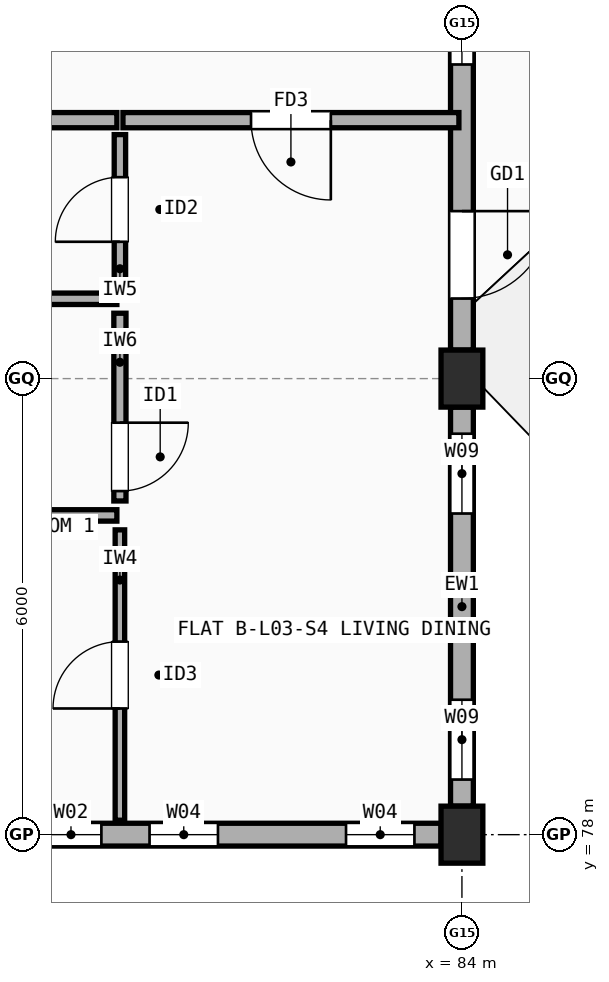
"""IFC4 building model, lengths in metres.
Left out: names, types, materials, properties, quantities, classifications, styles, units other than length and angle.
Written with IfcOpenShell. Run it as: python <this file> out.ifc"""

import sys

from ifc_helpers import new_model, si_unit, direction, frame, frame_2d, origin, origin_2d, place, context, subcontext, project, spatial, rectangle, extrude, element, fill, save


model = new_model("IFC4")
c1 = context("Model", 3, precision=1e-05, world=origin(), true_north=direction((0.0, 1.0)))
c2 = subcontext(c1, "Body", "Model", "MODEL_VIEW")
j1 = project(units=[si_unit("LENGTHUNIT", "METRE"), si_unit("PLANEANGLEUNIT", "RADIAN")], contexts=[c1])
p1 = place(None, origin())
s1 = spatial("IfcSite", under=j1, at=p1, CompositionType="ELEMENT")
p2 = place(p1, origin())
s2 = spatial("IfcBuilding", under=s1, at=p2, CompositionType="ELEMENT")
p3 = place(p2, frame((0.0, 0.0, 10.9)))
s3 = spatial("IfcBuildingStorey", under=s2, at=p3, CompositionType="ELEMENT", Elevation=10.9)
for number, where, z_axis, x_axis in (
    (1, (84.0, 78.0, 0.0), (0.0, 0.0, 1.0), (1.0, 0.0, 0.0)),
    (2, (84.0, 84.0, 0.0), (0.0, 0.0, 1.0), (1.0, 0.0, 0.0)),
):
    element("IfcColumn", number, at=place(p3, frame(where, z_axis=z_axis, x_axis=x_axis)), inside=s3, PredefinedType="COLUMN", context=c2, shape_type="SweptSolid", body=[
        extrude(rectangle(XDim=0.55, YDim=0.75, at=origin_2d()), origin(), (0.0, 0.0, 1.0), 2.96),
    ])
p4 = place(p3, frame((78.275, 78.0, 0.0), z_axis=(0.0, 0.0, 1.0), x_axis=(1.0, 0.0, 0.0)))
e3 = element("IfcWall", 3, at=p4, inside=s3, PredefinedType="STANDARD", context=c2, shape_type="SweptSolid", body=[
    extrude(rectangle(XDim=5.45, YDim=0.3, at=frame_2d((2.725, 0.0))), origin(), (0.0, 0.0, 1.0), 2.442),
])
p5 = place(p4, frame((1.615, 0.0, 0.9)))
e4 = element("IfcOpeningElement", 4, at=p5, cuts=e3, PredefinedType="OPENING", context=c2, shape_type="SweptSolid", body=[
    extrude(rectangle(XDim=0.9, YDim=1.3, at=frame_2d((0.45, 0.65))), frame((0.0, 0.16, 0.0), z_axis=(0.0, -1.0, 0.0), x_axis=(1.0, 0.0, 0.0)), (0.0, 0.0, 1.0), 0.32),
])
p6 = place(p4, frame((4.2, 0.0, 0.9)))
e5 = element("IfcOpeningElement", 5, at=p6, cuts=e3, PredefinedType="OPENING", context=c2, shape_type="SweptSolid", body=[
    extrude(rectangle(XDim=0.9, YDim=1.3, at=frame_2d((0.45, 0.65))), frame((0.0, 0.16, 0.0), z_axis=(0.0, -1.0, 0.0), x_axis=(1.0, 0.0, 0.0)), (0.0, 0.0, 1.0), 0.32),
])
p7 = place(p4, frame((0.181, 0.0, 0.9)))
e6 = element("IfcOpeningElement", 6, at=p7, cuts=e3, PredefinedType="OPENING", context=c2, shape_type="SweptSolid", body=[
    extrude(rectangle(XDim=0.8, YDim=1.2, at=frame_2d((0.4, 0.6))), frame((0.0, 0.16, 0.0), z_axis=(0.0, -1.0, 0.0), x_axis=(1.0, 0.0, 0.0)), (0.0, 0.0, 1.0), 0.32),
])
p8 = place(p3, frame((84.0, 78.375, 0.0), z_axis=(0.0, 0.0, 1.0), x_axis=(0.0, 1.0, 0.0)))
e7 = element("IfcWall", 7, at=p8, inside=s3, PredefinedType="STANDARD", context=c2, shape_type="SweptSolid", body=[
    extrude(rectangle(XDim=5.25, YDim=0.3, at=frame_2d((2.625, 0.0))), origin(), (0.0, 0.0, 1.0), 2.442),
])
p9 = place(p8, frame((0.35, 0.0, 0.9)))
e8 = element("IfcOpeningElement", 8, at=p9, cuts=e7, PredefinedType="OPENING", context=c2, shape_type="SweptSolid", body=[
    extrude(rectangle(XDim=1.05, YDim=1.35, at=frame_2d((0.525, 0.675))), frame((0.0, 0.16, 0.0), z_axis=(0.0, -1.0, 0.0), x_axis=(1.0, 0.0, 0.0)), (0.0, 0.0, 1.0), 0.32),
])
p10 = place(p8, frame((3.85, 0.0, 0.9)))
e9 = element("IfcOpeningElement", 9, at=p10, cuts=e7, PredefinedType="OPENING", context=c2, shape_type="SweptSolid", body=[
    extrude(rectangle(XDim=1.05, YDim=1.35, at=frame_2d((0.525, 0.675))), frame((0.0, 0.16, 0.0), z_axis=(0.0, -1.0, 0.0), x_axis=(1.0, 0.0, 0.0)), (0.0, 0.0, 1.0), 0.32),
])
p11 = place(p3, frame((84.0, 84.375, 0.0), z_axis=(0.0, 0.0, 1.0), x_axis=(0.0, 1.0, 0.0)))
e10 = element("IfcWall", 10, at=p11, inside=s3, PredefinedType="STANDARD", context=c2, shape_type="SweptSolid", body=[
    extrude(rectangle(XDim=5.25, YDim=0.3, at=frame_2d((2.625, 0.0))), origin(), (0.0, 0.0, 1.0), 2.442),
])
p12 = place(p11, frame((0.678, 0.0, 0.0)))
e11 = element("IfcOpeningElement", 11, at=p12, cuts=e10, PredefinedType="OPENING", context=c2, shape_type="SweptSolid", body=[
    extrude(rectangle(XDim=1.15, YDim=2.15, at=frame_2d((0.575, 1.075))), frame((0.0, 0.16, 0.0), z_axis=(0.0, -1.0, 0.0), x_axis=(1.0, 0.0, 0.0)), (0.0, 0.0, 1.0), 0.32),
])
p13 = place(p11, frame((3.758, 0.0, 0.9)))
e12 = element("IfcOpeningElement", 12, at=p13, cuts=e10, PredefinedType="OPENING", context=c2, shape_type="SweptSolid", body=[
    extrude(rectangle(XDim=0.8, YDim=1.2, at=frame_2d((0.4, 0.6))), frame((0.0, 0.16, 0.0), z_axis=(0.0, -1.0, 0.0), x_axis=(1.0, 0.0, 0.0)), (0.0, 0.0, 1.0), 0.32),
])
p14 = place(p3, frame((76.54, 87.4, 0.0), z_axis=(0.0, 0.0, 1.0), x_axis=(1.0, 0.0, 0.0)))
e13 = element("IfcWall", 13, at=p14, inside=s3, PredefinedType="SOLIDWALL", context=c2, shape_type="SweptSolid", body=[
    extrude(rectangle(XDim=2.92, YDim=0.2, at=frame_2d((1.46, 0.0))), origin(), (0.0, 0.0, 1.0), 2.442),
])
p15 = place(p3, frame((79.54, 87.4, 0.0), z_axis=(0.0, 0.0, 1.0), x_axis=(1.0, 0.0, 0.0)))
e14 = element("IfcWall", 14, at=p15, inside=s3, PredefinedType="SOLIDWALL", context=c2, shape_type="SweptSolid", body=[
    extrude(rectangle(XDim=4.42, YDim=0.2, at=frame_2d((2.21, 0.0))), origin(), (0.0, 0.0, 1.0), 2.442),
])
p16 = place(p15, frame((1.685, 0.0, 0.0)))
e15 = element("IfcOpeningElement", 15, at=p16, cuts=e14, PredefinedType="OPENING", context=c2, shape_type="SweptSolid", body=[
    extrude(rectangle(XDim=1.05, YDim=2.15, at=frame_2d((0.525, 1.075))), frame((0.0, 0.11, 0.0), z_axis=(0.0, -1.0, 0.0), x_axis=(1.0, 0.0, 0.0)), (0.0, 0.0, 1.0), 0.22),
])
p17 = place(p3, frame((79.5, 78.19, 0.0), z_axis=(0.0, 0.0, 1.0), x_axis=(0.0, 1.0, 0.0)))
e16 = element("IfcWall", 16, at=p17, inside=s3, PredefinedType="PARTITIONING", context=c2, shape_type="SweptSolid", body=[
    extrude(rectangle(XDim=3.82, YDim=0.125, at=frame_2d((1.91, 0.0))), origin(), (0.0, 0.0, 1.0), 2.96),
])
p18 = place(p17, frame((1.47, 0.0, 0.0)))
e17 = element("IfcOpeningElement", 17, at=p18, cuts=e16, PredefinedType="OPENING", context=c2, shape_type="SweptSolid", body=[
    extrude(rectangle(XDim=0.88, YDim=2.1, at=frame_2d((0.44, 1.05))), frame((0.0, 0.073, 0.0), z_axis=(0.0, -1.0, 0.0), x_axis=(1.0, 0.0, 0.0)), (0.0, 0.0, 1.0), 0.145),
])
p19 = place(p3, frame((79.5, 82.39, 0.0), z_axis=(0.0, 0.0, 1.0), x_axis=(0.0, 1.0, 0.0)))
e18 = element("IfcWall", 18, at=p19, inside=s3, PredefinedType="PLUMBINGWALL", context=c2, shape_type="SweptSolid", body=[
    extrude(rectangle(XDim=2.47, YDim=0.16, at=frame_2d((1.235, 0.0))), origin(), (0.0, 0.0, 1.0), 2.442),
])
p20 = place(p19, frame((0.13, 0.0, 0.0)))
e19 = element("IfcOpeningElement", 19, at=p20, cuts=e18, PredefinedType="OPENING", context=c2, shape_type="SweptSolid", body=[
    extrude(rectangle(XDim=0.9, YDim=2.1, at=frame_2d((0.45, 1.05))), frame((0.0, 0.09, 0.0), z_axis=(0.0, -1.0, 0.0), x_axis=(1.0, 0.0, 0.0)), (0.0, 0.0, 1.0), 0.18),
])
p21 = place(p3, frame((79.5, 85.24, 0.0), z_axis=(0.0, 0.0, 1.0), x_axis=(0.0, 1.0, 0.0)))
e20 = element("IfcWall", 20, at=p21, inside=s3, PredefinedType="PARTITIONING", context=c2, shape_type="SweptSolid", body=[
    extrude(rectangle(XDim=1.97, YDim=0.15, at=frame_2d((0.985, 0.0))), origin(), (0.0, 0.0, 1.0), 2.96),
])
p22 = place(p21, frame((0.56, 0.0, 0.0)))
e21 = element("IfcOpeningElement", 21, at=p22, cuts=e20, PredefinedType="OPENING", context=c2, shape_type="SweptSolid", body=[
    extrude(rectangle(XDim=0.85, YDim=2.1, at=frame_2d((0.425, 1.05))), frame((0.0, 0.085, 0.0), z_axis=(0.0, -1.0, 0.0), x_axis=(1.0, 0.0, 0.0)), (0.0, 0.0, 1.0), 0.17),
])
for number, where, z_axis, x_axis in (
    (22, (76.54, 82.2, 0.0), (0.0, 0.0, 1.0), (1.0, 0.0, 0.0)),
    (23, (76.54, 85.05, 0.0), (0.0, 0.0, 1.0), (1.0, 0.0, 0.0)),
):
    element("IfcWall", number, at=place(p3, frame(where, z_axis=z_axis, x_axis=x_axis)), inside=s3, PredefinedType="PARTITIONING", context=c2, shape_type="SweptSolid", body=[
        extrude(rectangle(XDim=2.92, YDim=0.15, at=frame_2d((1.46, 0.0))), origin(), (0.0, 0.0, 1.0), 2.442),
    ])
p23 = place(p5, origin())
e24 = element("IfcWindow", 24, at=p23, inside=s3, PartitioningType="SINGLE_PANEL", PredefinedType="WINDOW", context=c2, shape_type="SweptSolid", body=[
    extrude(rectangle(XDim=0.9, YDim=1.3, at=frame_2d((0.45, 0.65))), frame((0.0, 0.03, 0.0), z_axis=(0.0, -1.0, 0.0), x_axis=(1.0, 0.0, 0.0)), (0.0, 0.0, 1.0), 0.06),
])
fill(e4, e24)
p24 = place(p6, origin())
e25 = element("IfcWindow", 25, at=p24, inside=s3, PartitioningType="SINGLE_PANEL", PredefinedType="WINDOW", context=c2, shape_type="SweptSolid", body=[
    extrude(rectangle(XDim=0.9, YDim=1.3, at=frame_2d((0.45, 0.65))), frame((0.0, 0.03, 0.0), z_axis=(0.0, -1.0, 0.0), x_axis=(1.0, 0.0, 0.0)), (0.0, 0.0, 1.0), 0.06),
])
fill(e5, e25)
p25 = place(p9, origin())
e26 = element("IfcWindow", 26, at=p25, inside=s3, PartitioningType="SINGLE_PANEL", PredefinedType="WINDOW", context=c2, shape_type="SweptSolid", body=[
    extrude(rectangle(XDim=1.05, YDim=1.35, at=frame_2d((0.525, 0.675))), frame((0.0, 0.03, 0.0), z_axis=(0.0, -1.0, 0.0), x_axis=(1.0, 0.0, 0.0)), (0.0, 0.0, 1.0), 0.06),
])
fill(e8, e26)
p26 = place(p10, origin())
e27 = element("IfcWindow", 27, at=p26, inside=s3, PartitioningType="SINGLE_PANEL", PredefinedType="WINDOW", context=c2, shape_type="SweptSolid", body=[
    extrude(rectangle(XDim=1.05, YDim=1.35, at=frame_2d((0.525, 0.675))), frame((0.0, 0.03, 0.0), z_axis=(0.0, -1.0, 0.0), x_axis=(1.0, 0.0, 0.0)), (0.0, 0.0, 1.0), 0.06),
])
fill(e9, e27)
p27 = place(p12, frame((1.15, 0.0, 0.0), z_axis=(0.0, 0.0, 1.0), x_axis=(-1.0, 0.0, 0.0)))
e28 = element("IfcDoor", 28, at=p27, inside=s3, OperationType="SINGLE_SWING_RIGHT", PredefinedType="DOOR", context=c2, shape_type="SweptSolid", body=[
    extrude(rectangle(XDim=1.15, YDim=2.15, at=frame_2d((0.575, 1.075))), frame((0.0, 0.025, 0.0), z_axis=(0.0, -1.0, 0.0), x_axis=(1.0, 0.0, 0.0)), (0.0, 0.0, 1.0), 0.05),
])
fill(e11, e28)
p28 = place(p13, origin())
e29 = element("IfcWindow", 29, at=p28, inside=s3, PartitioningType="SINGLE_PANEL", PredefinedType="WINDOW", context=c2, shape_type="SweptSolid", body=[
    extrude(rectangle(XDim=0.8, YDim=1.2, at=frame_2d((0.4, 0.6))), frame((0.0, 0.03, 0.0), z_axis=(0.0, -1.0, 0.0), x_axis=(1.0, 0.0, 0.0)), (0.0, 0.0, 1.0), 0.06),
])
fill(e12, e29)
p29 = place(p7, origin())
e30 = element("IfcWindow", 30, at=p29, inside=s3, PartitioningType="SINGLE_PANEL", PredefinedType="WINDOW", context=c2, shape_type="SweptSolid", body=[
    extrude(rectangle(XDim=0.8, YDim=1.2, at=frame_2d((0.4, 0.6))), frame((0.0, 0.03, 0.0), z_axis=(0.0, -1.0, 0.0), x_axis=(1.0, 0.0, 0.0)), (0.0, 0.0, 1.0), 0.06),
])
fill(e6, e30)
p30 = place(p16, origin())
e31 = element("IfcDoor", 31, at=p30, inside=s3, OperationType="SINGLE_SWING_RIGHT", PredefinedType="DOOR", context=c2, shape_type="SweptSolid", body=[
    extrude(rectangle(XDim=1.05, YDim=2.15, at=frame_2d((0.525, 1.075))), frame((0.0, 0.025, 0.0), z_axis=(0.0, -1.0, 0.0), x_axis=(1.0, 0.0, 0.0)), (0.0, 0.0, 1.0), 0.05),
])
fill(e15, e31)
p31 = place(p18, origin())
e32 = element("IfcDoor", 32, at=p31, inside=s3, OperationType="SINGLE_SWING_LEFT", PredefinedType="DOOR", context=c2, shape_type="SweptSolid", body=[
    extrude(rectangle(XDim=0.88, YDim=2.1, at=frame_2d((0.44, 1.05))), frame((0.0, 0.025, 0.0), z_axis=(0.0, -1.0, 0.0), x_axis=(1.0, 0.0, 0.0)), (0.0, 0.0, 1.0), 0.05),
])
fill(e17, e32)
p32 = place(p20, origin())
e33 = element("IfcDoor", 33, at=p32, inside=s3, OperationType="SINGLE_SWING_RIGHT", PredefinedType="DOOR", context=c2, shape_type="SweptSolid", body=[
    extrude(rectangle(XDim=0.9, YDim=2.1, at=frame_2d((0.45, 1.05))), frame((0.0, 0.025, 0.0), z_axis=(0.0, -1.0, 0.0), x_axis=(1.0, 0.0, 0.0)), (0.0, 0.0, 1.0), 0.05),
])
fill(e19, e33)
p33 = place(p22, origin())
e34 = element("IfcDoor", 34, at=p33, inside=s3, OperationType="SINGLE_SWING_LEFT", PredefinedType="DOOR", context=c2, shape_type="SweptSolid", body=[
    extrude(rectangle(XDim=0.85, YDim=2.1, at=frame_2d((0.425, 1.05))), frame((0.0, 0.025, 0.0), z_axis=(0.0, -1.0, 0.0), x_axis=(1.0, 0.0, 0.0)), (0.0, 0.0, 1.0), 0.05),
])
fill(e21, e34)
save(model, sys.argv[1])
